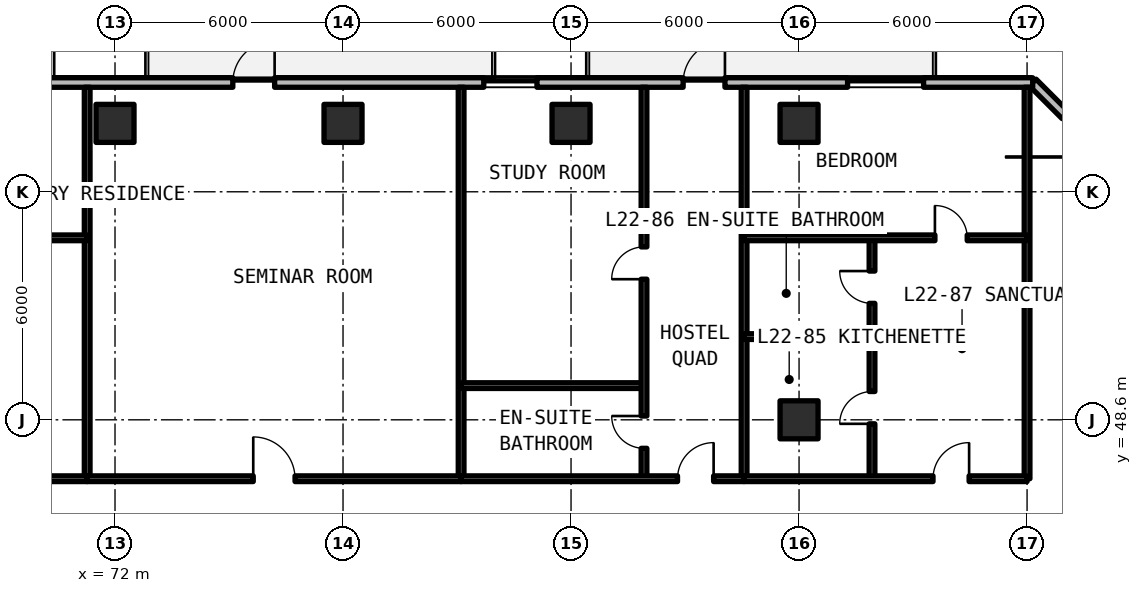
"""IFC4 building model, lengths in metres.
Left out: names, types, materials, properties, quantities, classifications, styles, units other than length and angle.
Written with IfcOpenShell. Run it as: python <this file> out.ifc"""

import sys

from ifc_helpers import new_model, si_unit, direction, frame, frame_2d, origin, origin_2d, place, context, subcontext, project, spatial, rectangle, extrude, element, fill, save


model = new_model("IFC4")
c1 = context("Model", 3, precision=1e-05, world=origin(), true_north=direction((0.0, 1.0)))
c2 = subcontext(c1, "Body", "Model", "MODEL_VIEW")
j1 = project(units=[si_unit("LENGTHUNIT", "METRE"), si_unit("PLANEANGLEUNIT", "RADIAN")], contexts=[c1])
p1 = place(None, origin())
s1 = spatial("IfcSite", under=j1, at=p1, CompositionType="ELEMENT")
p2 = place(p1, origin())
s2 = spatial("IfcBuilding", under=s1, at=p2, CompositionType="ELEMENT")
p3 = place(p2, frame((0.0, 0.0, 82.17)))
s3 = spatial("IfcBuildingStorey", under=s2, at=p3, CompositionType="ELEMENT", Elevation=82.17)
for number, where, z_axis, x_axis in (
    (1, (90.0, 48.6, 0.0), (0.0, 0.0, 1.0), (1.0, 0.0, 0.0)),
    (2, (72.0, 56.4, 0.0), (0.0, 0.0, 1.0), (1.0, 0.0, 0.0)),
    (3, (78.0, 56.4, 0.0), (0.0, 0.0, 1.0), (1.0, 0.0, 0.0)),
    (4, (84.0, 56.4, 0.0), (0.0, 0.0, 1.0), (1.0, 0.0, 0.0)),
    (5, (90.0, 56.4, 0.0), (0.0, 0.0, 1.0), (1.0, 0.0, 0.0)),
):
    element("IfcColumn", number, at=place(p3, frame(where, z_axis=z_axis, x_axis=x_axis)), inside=s3, PredefinedType="COLUMN", context=c2, shape_type="SweptSolid", body=[
        extrude(rectangle(XDim=1.0, YDim=1.0, at=origin_2d()), origin(), (0.0, 0.0, 1.0), 3.3),
    ])
p4 = place(p3, frame((100.275, 53.348, 0.0), z_axis=(0.0, 0.0, 1.0), x_axis=(-0.70708586489, 0.707127696864, 0.0)))
e6 = element("IfcWall", 6, at=p4, inside=s3, PredefinedType="SOLIDWALL", context=c2, shape_type="SweptSolid", body=[
    extrude(rectangle(XDim=5.836, YDim=0.25, at=frame_2d((2.918, 0.0))), origin(), (0.0, 0.0, 1.0), 3.08),
])
p5 = place(p4, frame((1.218, 0.0, 0.78)))
e7 = element("IfcOpeningElement", 7, at=p5, cuts=e6, PredefinedType="OPENING", context=c2, shape_type="SweptSolid", body=[
    extrude(rectangle(XDim=3.4, YDim=1.66, at=frame_2d((1.7, 0.83))), frame((0.0, 0.135, 0.0), z_axis=(0.0, -1.0, 0.0), x_axis=(1.0, 0.0, 0.0)), (0.0, 0.0, 1.0), 0.27),
])
p6 = place(p3, frame((96.148, 57.475, 0.0), z_axis=(0.0, 0.0, 1.0), x_axis=(-1.0, 0.0, 0.0)))
e8 = element("IfcWall", 8, at=p6, inside=s3, PredefinedType="SOLIDWALL", context=c2, shape_type="SweptSolid", body=[
    extrude(rectangle(XDim=44.023, YDim=0.25, at=frame_2d((22.012, 0.0))), origin(), (0.0, 0.0, 1.0), 3.08),
])
p7 = place(p6, frame((27.298, 0.0, 0.0)))
e9 = element("IfcOpeningElement", 9, at=p7, cuts=e8, PredefinedType="OPENING", context=c2, shape_type="SweptSolid", body=[
    extrude(rectangle(XDim=1.1, YDim=2.15, at=frame_2d((0.55, 1.075))), frame((0.0, 0.135, 0.0), z_axis=(0.0, -1.0, 0.0), x_axis=(1.0, 0.0, 0.0)), (0.0, 0.0, 1.0), 0.27),
])
p8 = place(p6, frame((19.948, 0.0, 0.0)))
e10 = element("IfcOpeningElement", 10, at=p8, cuts=e8, PredefinedType="OPENING", context=c2, shape_type="SweptSolid", body=[
    extrude(rectangle(XDim=1.1, YDim=2.15, at=frame_2d((0.55, 1.075))), frame((0.0, 0.135, 0.0), z_axis=(0.0, -1.0, 0.0), x_axis=(1.0, 0.0, 0.0)), (0.0, 0.0, 1.0), 0.27),
])
p9 = place(p6, frame((8.098, 0.0, 0.0)))
e11 = element("IfcOpeningElement", 11, at=p9, cuts=e8, PredefinedType="OPENING", context=c2, shape_type="SweptSolid", body=[
    extrude(rectangle(XDim=1.1, YDim=2.15, at=frame_2d((0.55, 1.075))), frame((0.0, 0.135, 0.0), z_axis=(0.0, -1.0, 0.0), x_axis=(1.0, 0.0, 0.0)), (0.0, 0.0, 1.0), 0.27),
])
p10 = place(p6, frame((39.336, 0.0, 0.78)))
e12 = element("IfcOpeningElement", 12, at=p10, cuts=e8, PredefinedType="OPENING", context=c2, shape_type="SweptSolid", body=[
    extrude(rectangle(XDim=2.0, YDim=1.66, at=frame_2d((1.0, 0.83))), frame((0.0, 0.135, 0.0), z_axis=(0.0, -1.0, 0.0), x_axis=(1.0, 0.0, 0.0)), (0.0, 0.0, 1.0), 0.27),
])
p11 = place(p6, frame((33.345, 0.0, 0.78)))
e13 = element("IfcOpeningElement", 13, at=p11, cuts=e8, PredefinedType="OPENING", context=c2, shape_type="SweptSolid", body=[
    extrude(rectangle(XDim=2.0, YDim=1.66, at=frame_2d((1.0, 0.83))), frame((0.0, 0.135, 0.0), z_axis=(0.0, -1.0, 0.0), x_axis=(1.0, 0.0, 0.0)), (0.0, 0.0, 1.0), 0.27),
])
p12 = place(p6, frame((13.044, 0.0, 0.78)))
e14 = element("IfcOpeningElement", 14, at=p12, cuts=e8, PredefinedType="OPENING", context=c2, shape_type="SweptSolid", body=[
    extrude(rectangle(XDim=1.4, YDim=1.65, at=frame_2d((0.7, 0.825))), frame((0.0, 0.135, 0.0), z_axis=(0.0, -1.0, 0.0), x_axis=(1.0, 0.0, 0.0)), (0.0, 0.0, 1.0), 0.27),
])
p13 = place(p6, frame((2.871, 0.0, 0.78)))
e15 = element("IfcOpeningElement", 15, at=p13, cuts=e8, PredefinedType="OPENING", context=c2, shape_type="SweptSolid", body=[
    extrude(rectangle(XDim=2.0, YDim=1.66, at=frame_2d((1.0, 0.83))), frame((0.0, 0.135, 0.0), z_axis=(0.0, -1.0, 0.0), x_axis=(1.0, 0.0, 0.0)), (0.0, 0.0, 1.0), 0.27),
])
for number, where, z_axis, x_axis in (
    (16, (96.0, 47.05, 0.0), (0.0, 0.0, 1.0), (0.0, 1.0, 0.0)),
    (17, (71.268, 47.05, 0.0), (0.0, 0.0, 1.0), (0.0, 1.0, 0.0)),
):
    element("IfcWall", number, at=place(p3, frame(where, z_axis=z_axis, x_axis=x_axis)), inside=s3, PredefinedType="SOLIDWALL", context=c2, shape_type="SweptSolid", body=[
        extrude(rectangle(XDim=10.3, YDim=0.15, at=frame_2d((5.15, 0.0))), origin(), (0.0, 0.0, 1.0), 2.35),
    ])
p14 = place(p3, frame((63.821, 53.388, 0.0), z_axis=(0.0, 0.0, 1.0), x_axis=(1.0, 0.0, 0.0)))
e18 = element("IfcWall", 18, at=p14, inside=s3, PredefinedType="PARTITIONING", context=c2, shape_type="SweptSolid", body=[
    extrude(rectangle(XDim=7.446, YDim=0.15, at=frame_2d((3.723, 0.0))), origin(), (0.0, 0.0, 1.0), 2.35),
])
p15 = place(p14, frame((5.387, 0.0, 0.0)))
e19 = element("IfcOpeningElement", 19, at=p15, cuts=e18, PredefinedType="OPENING", context=c2, shape_type="SweptSolid", body=[
    extrude(rectangle(XDim=0.85, YDim=2.1, at=frame_2d((0.425, 1.05))), frame((0.0, 0.085, 0.0), z_axis=(0.0, -1.0, 0.0), x_axis=(1.0, 0.0, 0.0)), (0.0, 0.0, 1.0), 0.17),
])
p16 = place(p3, frame((63.821, 47.05, 0.0), z_axis=(0.0, 0.0, 1.0), x_axis=(1.0, 0.0, 0.0)))
e20 = element("IfcWall", 20, at=p16, inside=s3, PredefinedType="SOLIDWALL", context=c2, shape_type="SweptSolid", body=[
    extrude(rectangle(XDim=7.446, YDim=0.15, at=frame_2d((3.723, 0.0))), origin(), (0.0, 0.0, 1.0), 2.35),
])
p17 = place(p16, frame((5.337, 0.0, 0.0)))
e21 = element("IfcOpeningElement", 21, at=p17, cuts=e20, PredefinedType="OPENING", context=c2, shape_type="SweptSolid", body=[
    extrude(rectangle(XDim=0.95, YDim=2.15, at=frame_2d((0.475, 1.075))), frame((0.0, 0.085, 0.0), z_axis=(0.0, -1.0, 0.0), x_axis=(1.0, 0.0, 0.0)), (0.0, 0.0, 1.0), 0.17),
])
p18 = place(p3, frame((81.107, 47.05, 0.0), z_axis=(0.0, 0.0, 1.0), x_axis=(0.0, 1.0, 0.0)))
e22 = element("IfcWall", 22, at=p18, inside=s3, PredefinedType="SOLIDWALL", context=c2, shape_type="SweptSolid", body=[
    extrude(rectangle(XDim=10.3, YDim=0.15, at=frame_2d((5.15, 0.0))), origin(), (0.0, 0.0, 1.0), 2.35),
])
p19 = place(p3, frame((71.268, 47.05, 0.0), z_axis=(0.0, 0.0, 1.0), x_axis=(1.0, 0.0, 0.0)))
e23 = element("IfcWall", 23, at=p19, inside=s3, PredefinedType="SOLIDWALL", context=c2, shape_type="SweptSolid", body=[
    extrude(rectangle(XDim=9.84, YDim=0.15, at=frame_2d((4.92, 0.0))), origin(), (0.0, 0.0, 1.0), 2.35),
])
p20 = place(p19, frame((4.37, 0.0, 0.0)))
e24 = element("IfcOpeningElement", 24, at=p20, cuts=e23, PredefinedType="OPENING", context=c2, shape_type="SweptSolid", body=[
    extrude(rectangle(XDim=1.1, YDim=2.15, at=frame_2d((0.55, 1.075))), frame((0.0, 0.085, 0.0), z_axis=(0.0, -1.0, 0.0), x_axis=(1.0, 0.0, 0.0)), (0.0, 0.0, 1.0), 0.17),
])
p21 = place(p3, frame((88.554, 47.05, 0.0), z_axis=(0.0, 0.0, 1.0), x_axis=(0.0, 1.0, 0.0)))
e25 = element("IfcWall", 25, at=p21, inside=s3, PredefinedType="SOLIDWALL", context=c2, shape_type="SweptSolid", body=[
    extrude(rectangle(XDim=10.3, YDim=0.15, at=frame_2d((5.15, 0.0))), origin(), (0.0, 0.0, 1.0), 2.35),
])
p22 = place(p3, frame((81.107, 49.5, 0.0), z_axis=(0.0, 0.0, 1.0), x_axis=(1.0, 0.0, 0.0)))
e26 = element("IfcWall", 26, at=p22, inside=s3, PredefinedType="PARTITIONING", context=c2, shape_type="SweptSolid", body=[
    extrude(rectangle(XDim=4.812, YDim=0.15, at=frame_2d((2.406, 0.0))), origin(), (0.0, 0.0, 1.0), 2.35),
])
p23 = place(p3, frame((85.92, 47.05, 0.0), z_axis=(0.0, 0.0, 1.0), x_axis=(0.0, 1.0, 0.0)))
e27 = element("IfcWall", 27, at=p23, inside=s3, PredefinedType="PARTITIONING", context=c2, shape_type="SweptSolid", body=[
    extrude(rectangle(XDim=10.3, YDim=0.15, at=frame_2d((5.15, 0.0))), origin(), (0.0, 0.0, 1.0), 2.35),
])
p24 = place(p23, frame((0.8, 0.0, 0.0)))
e28 = element("IfcOpeningElement", 28, at=p24, cuts=e27, PredefinedType="OPENING", context=c2, shape_type="SweptSolid", body=[
    extrude(rectangle(XDim=0.85, YDim=2.1, at=frame_2d((0.425, 1.05))), frame((0.0, 0.085, 0.0), z_axis=(0.0, -1.0, 0.0), x_axis=(1.0, 0.0, 0.0)), (0.0, 0.0, 1.0), 0.17),
])
p25 = place(p23, frame((5.25, 0.0, 0.0)))
e29 = element("IfcOpeningElement", 29, at=p25, cuts=e27, PredefinedType="OPENING", context=c2, shape_type="SweptSolid", body=[
    extrude(rectangle(XDim=0.85, YDim=2.1, at=frame_2d((0.425, 1.05))), frame((0.0, 0.085, 0.0), z_axis=(0.0, -1.0, 0.0), x_axis=(1.0, 0.0, 0.0)), (0.0, 0.0, 1.0), 0.17),
])
p26 = place(p3, frame((81.107, 47.05, 0.0), z_axis=(0.0, 0.0, 1.0), x_axis=(1.0, 0.0, 0.0)))
e30 = element("IfcWall", 30, at=p26, inside=s3, PredefinedType="SOLIDWALL", context=c2, shape_type="SweptSolid", body=[
    extrude(rectangle(XDim=7.446, YDim=0.15, at=frame_2d((3.723, 0.0))), origin(), (0.0, 0.0, 1.0), 2.35),
])
p27 = place(p26, frame((5.694, 0.0, 0.0)))
e31 = element("IfcOpeningElement", 31, at=p27, cuts=e30, PredefinedType="OPENING", context=c2, shape_type="SweptSolid", body=[
    extrude(rectangle(XDim=0.95, YDim=2.15, at=frame_2d((0.475, 1.075))), frame((0.0, 0.085, 0.0), z_axis=(0.0, -1.0, 0.0), x_axis=(1.0, 0.0, 0.0)), (0.0, 0.0, 1.0), 0.17),
])
p28 = place(p3, frame((88.554, 50.79, 0.0), z_axis=(0.0, 0.0, 1.0), x_axis=(1.0, 0.0, 0.0)))
e32 = element("IfcWall", 32, at=p28, inside=s3, PredefinedType="PARTITIONING", context=c2, shape_type="SweptSolid", body=[
    extrude(rectangle(XDim=3.366, YDim=0.15, at=frame_2d((1.683, 0.0))), origin(), (0.0, 0.0, 1.0), 2.35),
])
p29 = place(p3, frame((91.92, 47.05, 0.0), z_axis=(0.0, 0.0, 1.0), x_axis=(0.0, 1.0, 0.0)))
e33 = element("IfcWall", 33, at=p29, inside=s3, PredefinedType="PARTITIONING", context=c2, shape_type="SweptSolid", body=[
    extrude(rectangle(XDim=6.338, YDim=0.15, at=frame_2d((3.169, 0.0))), origin(), (0.0, 0.0, 1.0), 2.35),
])
p30 = place(p29, frame((1.445, 0.0, 0.0)))
e34 = element("IfcOpeningElement", 34, at=p30, cuts=e33, PredefinedType="OPENING", context=c2, shape_type="SweptSolid", body=[
    extrude(rectangle(XDim=0.85, YDim=2.1, at=frame_2d((0.425, 1.05))), frame((0.0, 0.085, 0.0), z_axis=(0.0, -1.0, 0.0), x_axis=(1.0, 0.0, 0.0)), (0.0, 0.0, 1.0), 0.17),
])
p31 = place(p29, frame((4.614, 0.0, 0.0)))
e35 = element("IfcOpeningElement", 35, at=p31, cuts=e33, PredefinedType="OPENING", context=c2, shape_type="SweptSolid", body=[
    extrude(rectangle(XDim=0.85, YDim=2.1, at=frame_2d((0.425, 1.05))), frame((0.0, 0.085, 0.0), z_axis=(0.0, -1.0, 0.0), x_axis=(1.0, 0.0, 0.0)), (0.0, 0.0, 1.0), 0.17),
])
p32 = place(p3, frame((88.554, 53.388, 0.0), z_axis=(0.0, 0.0, 1.0), x_axis=(1.0, 0.0, 0.0)))
e36 = element("IfcWall", 36, at=p32, inside=s3, PredefinedType="PARTITIONING", context=c2, shape_type="SweptSolid", body=[
    extrude(rectangle(XDim=7.446, YDim=0.15, at=frame_2d((3.723, 0.0))), origin(), (0.0, 0.0, 1.0), 2.35),
])
p33 = place(p32, frame((5.021, 0.0, 0.0)))
e37 = element("IfcOpeningElement", 37, at=p33, cuts=e36, PredefinedType="OPENING", context=c2, shape_type="SweptSolid", body=[
    extrude(rectangle(XDim=0.85, YDim=2.1, at=frame_2d((0.425, 1.05))), frame((0.0, 0.085, 0.0), z_axis=(0.0, -1.0, 0.0), x_axis=(1.0, 0.0, 0.0)), (0.0, 0.0, 1.0), 0.17),
])
p34 = place(p3, frame((88.554, 47.05, 0.0), z_axis=(0.0, 0.0, 1.0), x_axis=(1.0, 0.0, 0.0)))
e38 = element("IfcWall", 38, at=p34, inside=s3, PredefinedType="SOLIDWALL", context=c2, shape_type="SweptSolid", body=[
    extrude(rectangle(XDim=7.446, YDim=0.15, at=frame_2d((3.723, 0.0))), origin(), (0.0, 0.0, 1.0), 2.35),
])
p35 = place(p34, frame((4.971, 0.0, 0.0)))
e39 = element("IfcOpeningElement", 39, at=p35, cuts=e38, PredefinedType="OPENING", context=c2, shape_type="SweptSolid", body=[
    extrude(rectangle(XDim=0.95, YDim=2.15, at=frame_2d((0.475, 1.075))), frame((0.0, 0.085, 0.0), z_axis=(0.0, -1.0, 0.0), x_axis=(1.0, 0.0, 0.0)), (0.0, 0.0, 1.0), 0.17),
])
p36 = place(p8, frame((1.1, 0.0, 0.0), z_axis=(0.0, 0.0, 1.0), x_axis=(-1.0, 0.0, 0.0)))
e40 = element("IfcDoor", 40, at=p36, inside=s3, OperationType="SINGLE_SWING_RIGHT", PredefinedType="DOOR", context=c2, shape_type="SweptSolid", body=[
    extrude(rectangle(XDim=1.1, YDim=2.15, at=frame_2d((0.55, 1.075))), frame((0.0, 0.025, 0.0), z_axis=(0.0, -1.0, 0.0), x_axis=(1.0, 0.0, 0.0)), (0.0, 0.0, 1.0), 0.05),
])
fill(e10, e40)
p37 = place(p9, frame((1.1, 0.0, 0.0), z_axis=(0.0, 0.0, 1.0), x_axis=(-1.0, 0.0, 0.0)))
e41 = element("IfcDoor", 41, at=p37, inside=s3, OperationType="SINGLE_SWING_LEFT", PredefinedType="DOOR", context=c2, shape_type="SweptSolid", body=[
    extrude(rectangle(XDim=1.1, YDim=2.15, at=frame_2d((0.55, 1.075))), frame((0.0, 0.025, 0.0), z_axis=(0.0, -1.0, 0.0), x_axis=(1.0, 0.0, 0.0)), (0.0, 0.0, 1.0), 0.05),
])
fill(e11, e41)
p38 = place(p12, origin())
e42 = element("IfcWindow", 42, at=p38, inside=s3, PartitioningType="SINGLE_PANEL", PredefinedType="WINDOW", context=c2, shape_type="SweptSolid", body=[
    extrude(rectangle(XDim=1.4, YDim=1.65, at=frame_2d((0.7, 0.825))), frame((0.0, 0.03, 0.0), z_axis=(0.0, -1.0, 0.0), x_axis=(1.0, 0.0, 0.0)), (0.0, 0.0, 1.0), 0.06),
])
fill(e14, e42)
p39 = place(p13, origin())
e43 = element("IfcWindow", 43, at=p39, inside=s3, PartitioningType="SINGLE_PANEL", PredefinedType="WINDOW", context=c2, shape_type="SweptSolid", body=[
    extrude(rectangle(XDim=2.0, YDim=1.66, at=frame_2d((1.0, 0.83))), frame((0.0, 0.03, 0.0), z_axis=(0.0, -1.0, 0.0), x_axis=(1.0, 0.0, 0.0)), (0.0, 0.0, 1.0), 0.06),
])
fill(e15, e43)
p40 = place(p20, origin())
e44 = element("IfcDoor", 44, at=p40, inside=s3, OperationType="SINGLE_SWING_LEFT", PredefinedType="DOOR", context=c2, shape_type="SweptSolid", body=[
    extrude(rectangle(XDim=1.1, YDim=2.15, at=frame_2d((0.55, 1.075))), frame((0.0, 0.025, 0.0), z_axis=(0.0, -1.0, 0.0), x_axis=(1.0, 0.0, 0.0)), (0.0, 0.0, 1.0), 0.05),
])
fill(e24, e44)
p41 = place(p24, origin())
e45 = element("IfcDoor", 45, at=p41, inside=s3, OperationType="SINGLE_SWING_RIGHT", PredefinedType="DOOR", context=c2, shape_type="SweptSolid", body=[
    extrude(rectangle(XDim=0.85, YDim=2.1, at=frame_2d((0.425, 1.05))), frame((0.0, 0.025, 0.0), z_axis=(0.0, -1.0, 0.0), x_axis=(1.0, 0.0, 0.0)), (0.0, 0.0, 1.0), 0.05),
])
fill(e28, e45)
p42 = place(p25, origin())
e46 = element("IfcDoor", 46, at=p42, inside=s3, OperationType="SINGLE_SWING_LEFT", PredefinedType="DOOR", context=c2, shape_type="SweptSolid", body=[
    extrude(rectangle(XDim=0.85, YDim=2.1, at=frame_2d((0.425, 1.05))), frame((0.0, 0.025, 0.0), z_axis=(0.0, -1.0, 0.0), x_axis=(1.0, 0.0, 0.0)), (0.0, 0.0, 1.0), 0.05),
])
fill(e29, e46)
p43 = place(p27, origin())
e47 = element("IfcDoor", 47, at=p43, inside=s3, OperationType="SINGLE_SWING_RIGHT", PredefinedType="DOOR", context=c2, shape_type="SweptSolid", body=[
    extrude(rectangle(XDim=0.95, YDim=2.15, at=frame_2d((0.475, 1.075))), frame((0.0, 0.025, 0.0), z_axis=(0.0, -1.0, 0.0), x_axis=(1.0, 0.0, 0.0)), (0.0, 0.0, 1.0), 0.05),
])
fill(e31, e47)
p44 = place(p30, origin())
e48 = element("IfcDoor", 48, at=p44, inside=s3, OperationType="SINGLE_SWING_LEFT", PredefinedType="DOOR", context=c2, shape_type="SweptSolid", body=[
    extrude(rectangle(XDim=0.85, YDim=2.1, at=frame_2d((0.425, 1.05))), frame((0.0, 0.025, 0.0), z_axis=(0.0, -1.0, 0.0), x_axis=(1.0, 0.0, 0.0)), (0.0, 0.0, 1.0), 0.05),
])
fill(e34, e48)
p45 = place(p31, origin())
e49 = element("IfcDoor", 49, at=p45, inside=s3, OperationType="SINGLE_SWING_RIGHT", PredefinedType="DOOR", context=c2, shape_type="SweptSolid", body=[
    extrude(rectangle(XDim=0.85, YDim=2.1, at=frame_2d((0.425, 1.05))), frame((0.0, 0.025, 0.0), z_axis=(0.0, -1.0, 0.0), x_axis=(1.0, 0.0, 0.0)), (0.0, 0.0, 1.0), 0.05),
])
fill(e35, e49)
p46 = place(p33, origin())
e50 = element("IfcDoor", 50, at=p46, inside=s3, OperationType="SINGLE_SWING_LEFT", PredefinedType="DOOR", context=c2, shape_type="SweptSolid", body=[
    extrude(rectangle(XDim=0.85, YDim=2.1, at=frame_2d((0.425, 1.05))), frame((0.0, 0.025, 0.0), z_axis=(0.0, -1.0, 0.0), x_axis=(1.0, 0.0, 0.0)), (0.0, 0.0, 1.0), 0.05),
])
fill(e37, e50)
p47 = place(p35, origin())
e51 = element("IfcDoor", 51, at=p47, inside=s3, OperationType="SINGLE_SWING_RIGHT", PredefinedType="DOOR", context=c2, shape_type="SweptSolid", body=[
    extrude(rectangle(XDim=0.95, YDim=2.15, at=frame_2d((0.475, 1.075))), frame((0.0, 0.025, 0.0), z_axis=(0.0, -1.0, 0.0), x_axis=(1.0, 0.0, 0.0)), (0.0, 0.0, 1.0), 0.05),
])
fill(e39, e51)
save(model, sys.argv[1])
